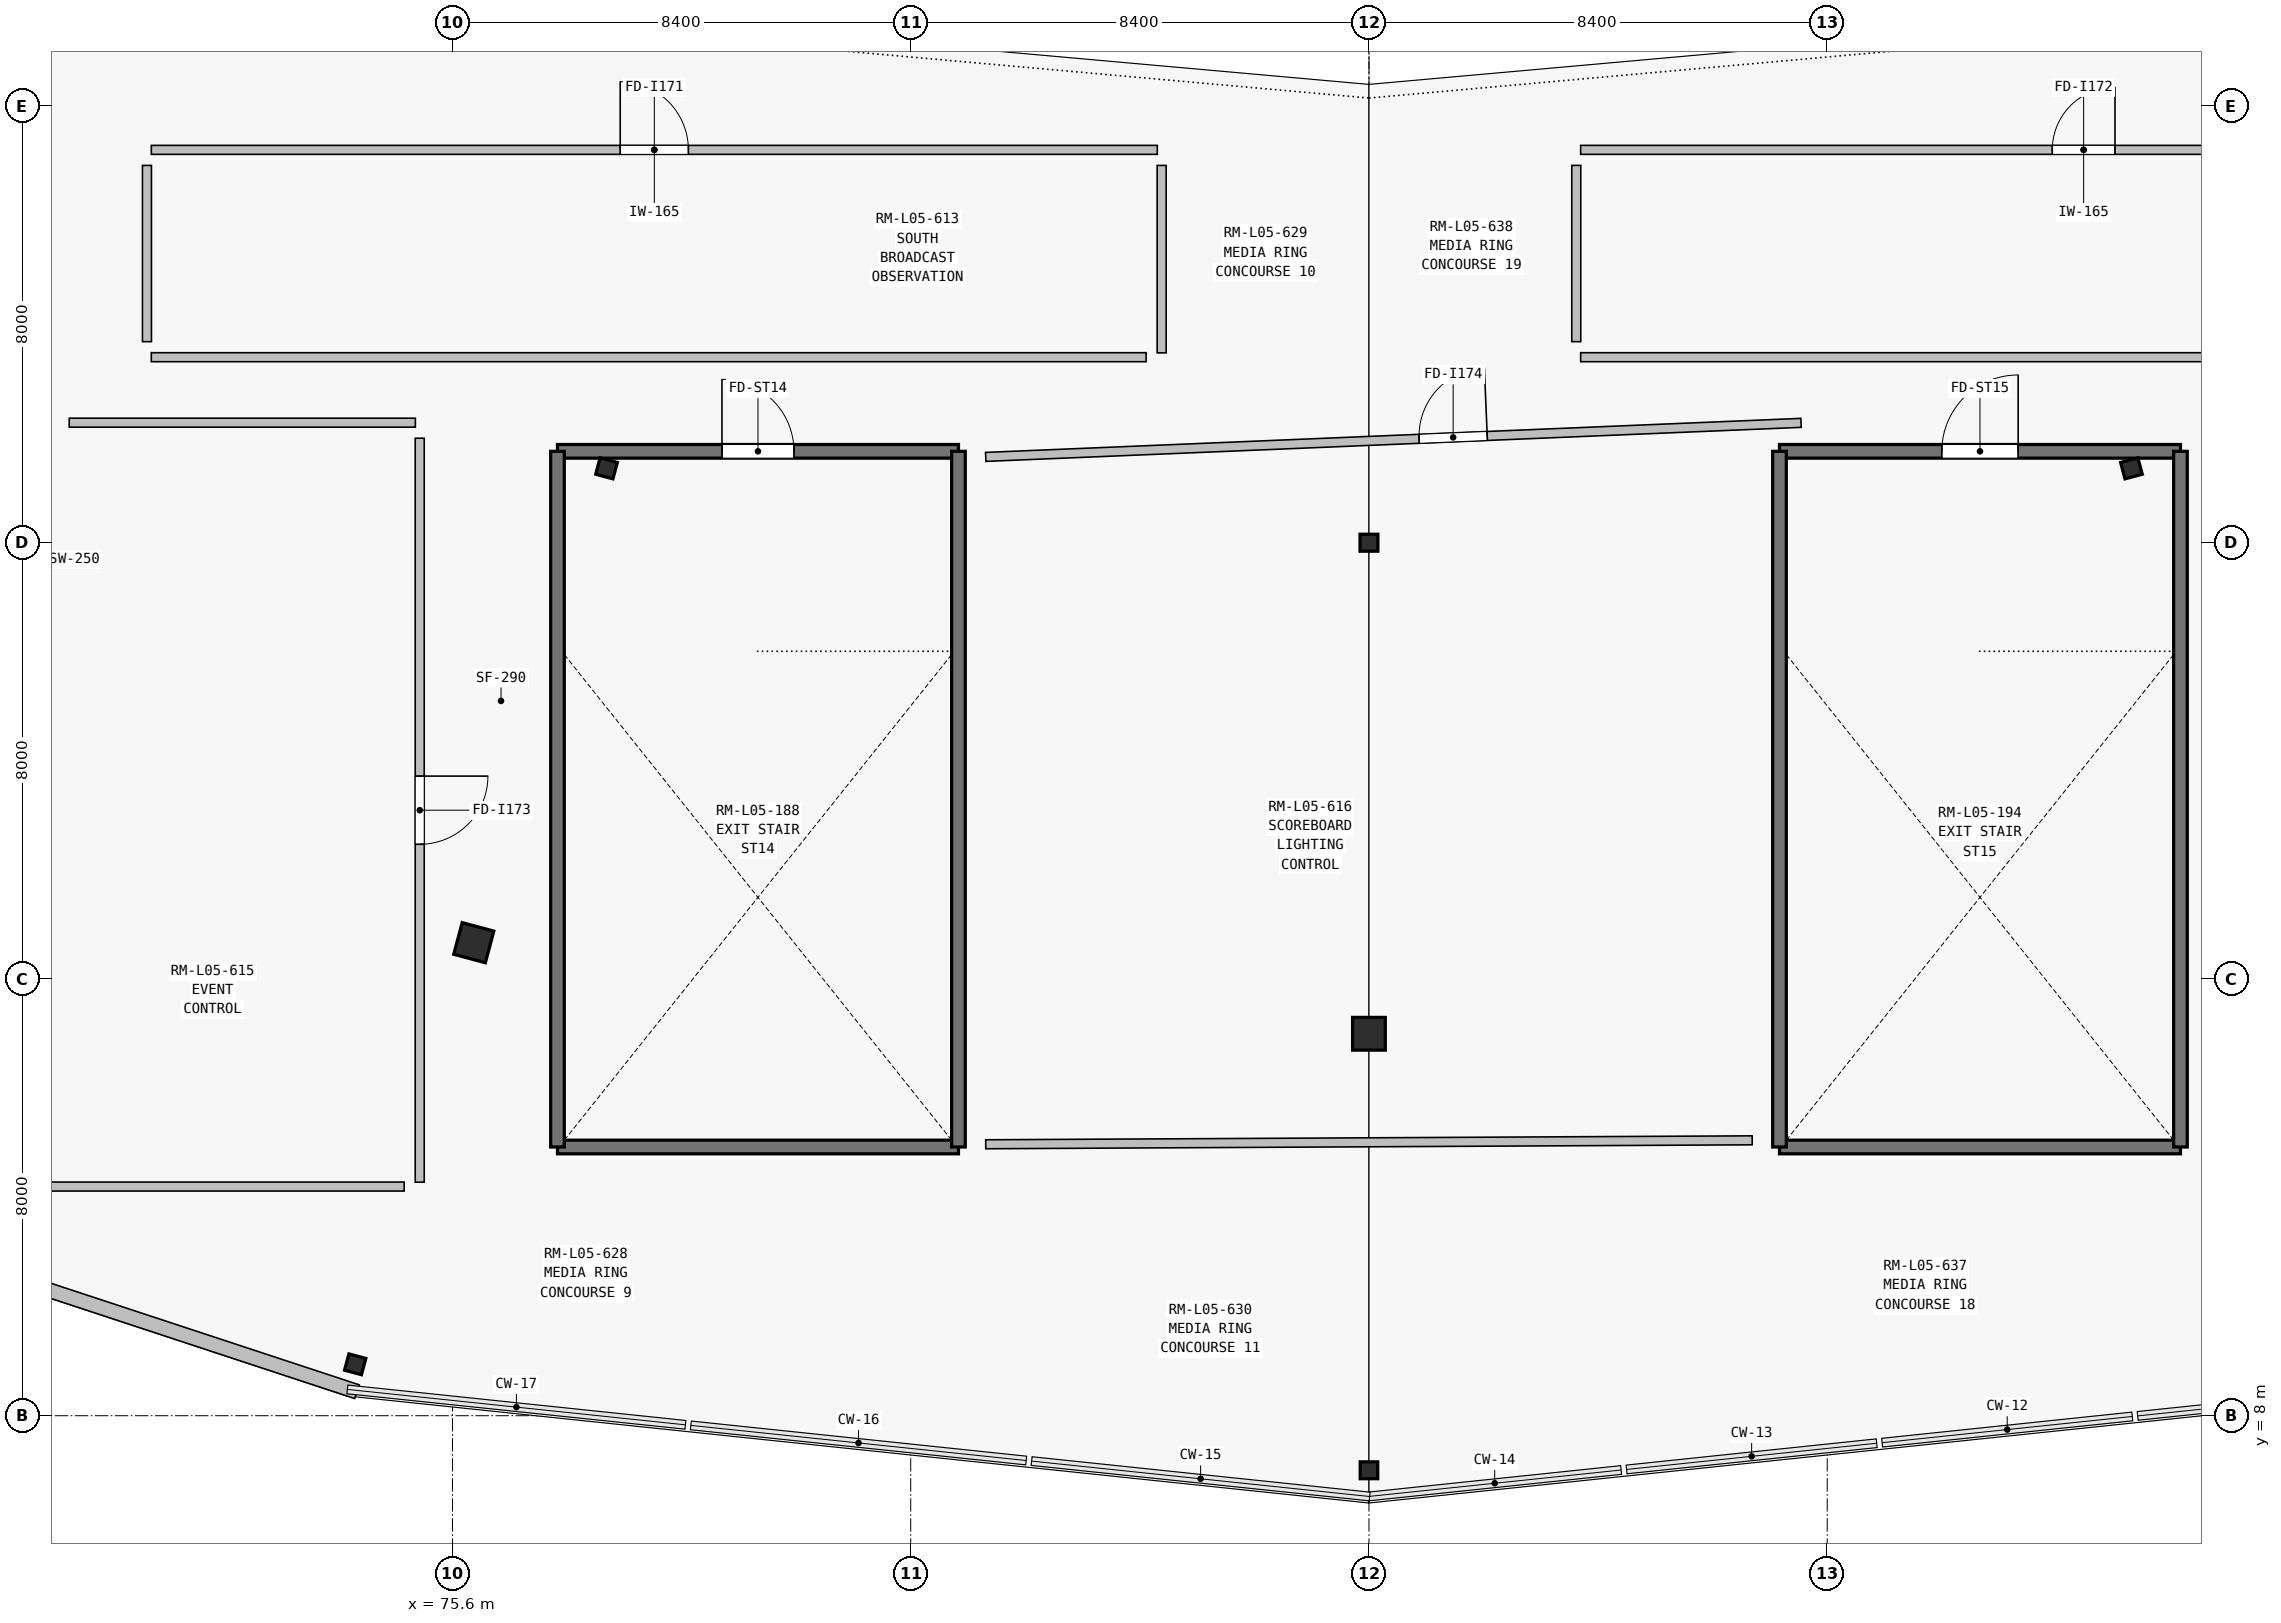
"""IFC4 building model, lengths in metres.
Left out: names, types, materials, properties, quantities, classifications, styles, units other than length and angle.
Written with IfcOpenShell. Run it as: python <this file> out.ifc"""

import sys

from ifc_helpers import new_model, si_unit, direction, frame, frame_2d, origin, origin_2d, place, context, subcontext, project, spatial, rectangle, i_section, extrude, element, fill, save


model = new_model("IFC4")
c1 = context("Model", 3, precision=1e-05, world=origin(), true_north=direction((0.0, 1.0)))
c2 = subcontext(c1, "Body", "Model", "MODEL_VIEW")
j1 = project(units=[si_unit("LENGTHUNIT", "METRE"), si_unit("PLANEANGLEUNIT", "RADIAN")], contexts=[c1])
p1 = place(None, origin())
s1 = spatial("IfcSite", under=j1, at=p1, CompositionType="ELEMENT")
p2 = place(p1, origin())
s2 = spatial("IfcBuilding", under=s1, at=p2, CompositionType="ELEMENT")
p3 = place(p2, frame((0.0, 0.0, 23.4)))
s3 = spatial("IfcBuildingStorey", under=s2, at=p3, CompositionType="ELEMENT", Elevation=23.4)
for number, where, z_axis, x_axis in (
    (1, (78.424, 25.363, 0.0), (0.0, 0.0, 1.0), (-0.259, -0.966, 0.0)),
    (2, (92.4, 24.0, 0.0), (0.0, 0.0, 1.0), (0.0, -1.0, 0.0)),
    (3, (106.376, 25.363, 0.0), (0.0, 0.0, 1.0), (0.259, -0.966, 0.0)),
):
    element("IfcColumn", number, at=place(p3, frame(where, z_axis=z_axis, x_axis=x_axis)), inside=s3, PredefinedType="COLUMN", context=c2, shape_type="SweptSolid", body=[
        extrude(i_section(OverallWidth=0.311, OverallDepth=0.327, WebThickness=0.016, FlangeThickness=0.025, at=origin_2d()), origin(), (0.0, 0.0, 1.0), 3.15),
    ])
for number, where, z_axis, x_axis in (
    (4, (75.991, 16.67, 0.0), (0.0, 0.0, 1.0), (-0.259, -0.966, 0.0)),
    (5, (92.4, 15.0, 0.0), (0.0, 0.0, 1.0), (0.0, -1.0, 0.0)),
):
    element("IfcColumn", number, at=place(p3, frame(where, z_axis=z_axis, x_axis=x_axis)), inside=s3, PredefinedType="COLUMN", context=c2, shape_type="SweptSolid", body=[
        extrude(rectangle(XDim=0.6, YDim=0.6, at=origin_2d()), origin(), (0.0, 0.0, 1.0), 3.15),
    ])
for number, where, z_axis, x_axis in (
    (6, (73.817, 8.942, 0.0), (0.0, 0.0, 1.0), (-0.259, -0.966, 0.0)),
    (7, (92.4, 7.0, 0.0), (0.0, 0.0, 1.0), (0.0, -1.0, 0.0)),
):
    element("IfcColumn", number, at=place(p3, frame(where, z_axis=z_axis, x_axis=x_axis)), inside=s3, PredefinedType="COLUMN", context=c2, shape_type="SweptSolid", body=[
        extrude(i_section(OverallWidth=0.309, OverallDepth=0.321, WebThickness=0.014, FlangeThickness=0.022, at=origin_2d()), origin(), (0.0, 0.0, 1.0), 3.32),
    ])
p4 = place(p3, frame((73.849, 8.44, 0.0), z_axis=(0.0, 0.0, 1.0), x_axis=(-0.949760483421, 0.312977673536, 0.0)))
e8 = element("IfcWall", 8, at=p4, inside=s3, PredefinedType="SOLIDWALL", context=c2, shape_type="SweptSolid", body=[
    extrude(rectangle(XDim=18.693, YDim=0.265, at=frame_2d((9.346, 0.0))), origin(), (0.0, 0.0, 1.0), 3.18),
])
p5 = place(p4, frame((11.85, 0.0, 0.75)))
e9 = element("IfcOpeningElement", 9, at=p5, cuts=e8, PredefinedType="OPENING", context=c2, shape_type="SweptSolid", body=[
    extrude(rectangle(XDim=1.2, YDim=2.2, at=frame_2d((0.6, 1.1))), frame((0.0, 0.142, 0.0), z_axis=(0.0, -1.0, 0.0), x_axis=(1.0, 0.0, 0.0)), (0.0, 0.0, 1.0), 0.285),
])
p6 = place(p3, frame((77.525, 12.925, 0.0), z_axis=(0.0, 0.0, 1.0), x_axis=(1.0, 0.0, 0.0)))
e10 = element("IfcWall", 10, at=p6, inside=s3, PredefinedType="SHEAR", context=c2, shape_type="SweptSolid", body=[
    extrude(rectangle(XDim=7.35, YDim=0.25, at=frame_2d((3.675, 0.0))), origin(), (0.0, 0.0, 1.0), 3.08),
])
p7 = place(p3, frame((77.525, 25.675, 0.0), z_axis=(0.0, 0.0, 1.0), x_axis=(1.0, 0.0, 0.0)))
e11 = element("IfcWall", 11, at=p7, inside=s3, PredefinedType="SHEAR", context=c2, shape_type="SweptSolid", body=[
    extrude(rectangle(XDim=7.35, YDim=0.25, at=frame_2d((3.675, 0.0))), origin(), (0.0, 0.0, 1.0), 3.08),
])
p8 = place(p7, frame((3.015, 0.0, 0.0)))
e12 = element("IfcOpeningElement", 12, at=p8, cuts=e11, PredefinedType="OPENING", context=c2, shape_type="SweptSolid", body=[
    extrude(rectangle(XDim=1.32, YDim=2.2, at=frame_2d((0.66, 1.1))), frame((0.0, 0.135, 0.0), z_axis=(0.0, -1.0, 0.0), x_axis=(1.0, 0.0, 0.0)), (0.0, 0.0, 1.0), 0.27),
])
for number, where, z_axis, x_axis in (
    (13, (77.525, 12.925, 0.0), (0.0, 0.0, 1.0), (0.0, 1.0, 0.0)),
    (14, (84.875, 12.925, 0.0), (0.0, 0.0, 1.0), (0.0, 1.0, 0.0)),
):
    element("IfcWall", number, at=place(p3, frame(where, z_axis=z_axis, x_axis=x_axis)), inside=s3, PredefinedType="SHEAR", context=c2, shape_type="SweptSolid", body=[
        extrude(rectangle(XDim=12.75, YDim=0.25, at=frame_2d((6.375, 0.0))), origin(), (0.0, 0.0, 1.0), 3.08),
    ])
p9 = place(p3, frame((99.925, 12.925, 0.0), z_axis=(0.0, 0.0, 1.0), x_axis=(1.0, 0.0, 0.0)))
e15 = element("IfcWall", 15, at=p9, inside=s3, PredefinedType="SHEAR", context=c2, shape_type="SweptSolid", body=[
    extrude(rectangle(XDim=7.35, YDim=0.25, at=frame_2d((3.675, 0.0))), origin(), (0.0, 0.0, 1.0), 3.08),
])
p10 = place(p3, frame((99.925, 25.675, 0.0), z_axis=(0.0, 0.0, 1.0), x_axis=(1.0, 0.0, 0.0)))
e16 = element("IfcWall", 16, at=p10, inside=s3, PredefinedType="SHEAR", context=c2, shape_type="SweptSolid", body=[
    extrude(rectangle(XDim=7.35, YDim=0.25, at=frame_2d((3.675, 0.0))), origin(), (0.0, 0.0, 1.0), 3.08),
])
p11 = place(p10, frame((2.975, 0.0, 0.0)))
e17 = element("IfcOpeningElement", 17, at=p11, cuts=e16, PredefinedType="OPENING", context=c2, shape_type="SweptSolid", body=[
    extrude(rectangle(XDim=1.4, YDim=2.2, at=frame_2d((0.7, 1.1))), frame((0.0, 0.135, 0.0), z_axis=(0.0, -1.0, 0.0), x_axis=(1.0, 0.0, 0.0)), (0.0, 0.0, 1.0), 0.27),
])
for number, where, z_axis, x_axis in (
    (18, (99.925, 12.925, 0.0), (0.0, 0.0, 1.0), (0.0, 1.0, 0.0)),
    (19, (107.275, 12.925, 0.0), (0.0, 0.0, 1.0), (0.0, 1.0, 0.0)),
):
    element("IfcWall", number, at=place(p3, frame(where, z_axis=z_axis, x_axis=x_axis)), inside=s3, PredefinedType="SHEAR", context=c2, shape_type="SweptSolid", body=[
        extrude(rectangle(XDim=12.75, YDim=0.25, at=frame_2d((6.375, 0.0))), origin(), (0.0, 0.0, 1.0), 3.08),
    ])
p12 = place(p3, frame((70.08, 31.2, 0.0), z_axis=(0.0, 0.0, 1.0), x_axis=(1.0, 0.0, 0.0)))
e20 = element("IfcWall", 20, at=p12, inside=s3, PredefinedType="PARTITIONING", context=c2, shape_type="SweptSolid", body=[
    extrude(rectangle(XDim=18.44, YDim=0.165, at=frame_2d((9.22, 0.0))), origin(), (0.0, 0.0, 1.0), 3.9),
])
p13 = place(p12, frame((8.595, 0.0, 0.0)))
e21 = element("IfcOpeningElement", 21, at=p13, cuts=e20, PredefinedType="OPENING", context=c2, shape_type="SweptSolid", body=[
    extrude(rectangle(XDim=1.25, YDim=2.25, at=frame_2d((0.625, 1.125))), frame((0.0, 0.093, 0.0), z_axis=(0.0, -1.0, 0.0), x_axis=(1.0, 0.0, 0.0)), (0.0, 0.0, 1.0), 0.185),
])
p14 = place(p3, frame((88.6, 30.915, 0.0), z_axis=(0.0, 0.0, 1.0), x_axis=(0.0, -1.0, 0.0)))
e22 = element("IfcWall", 22, at=p14, inside=s3, PredefinedType="PARTITIONING", context=c2, shape_type="SweptSolid", body=[
    extrude(rectangle(XDim=3.435, YDim=0.165, at=frame_2d((1.718, 0.0))), origin(), (0.0, 0.0, 1.0), 3.9),
])
p15 = place(p3, frame((88.315, 27.4, 0.0), z_axis=(0.0, 0.0, 1.0), x_axis=(-1.0, 0.0, 0.0)))
e23 = element("IfcWall", 23, at=p15, inside=s3, PredefinedType="PARTITIONING", context=c2, shape_type="SweptSolid", body=[
    extrude(rectangle(XDim=18.235, YDim=0.165, at=frame_2d((9.118, 0.0))), origin(), (0.0, 0.0, 1.0), 2.445),
])
p16 = place(p3, frame((70.0, 27.685, 0.0), z_axis=(0.0, 0.0, 1.0), x_axis=(0.0, 1.0, 0.0)))
e24 = element("IfcWall", 24, at=p16, inside=s3, PredefinedType="PARTITIONING", context=c2, shape_type="SweptSolid", body=[
    extrude(rectangle(XDim=3.23, YDim=0.165, at=frame_2d((1.615, 0.0))), origin(), (0.0, 0.0, 1.0), 2.445),
])
p17 = place(p3, frame((96.28, 31.2, 0.0), z_axis=(0.0, 0.0, 1.0), x_axis=(1.0, 0.0, 0.0)))
e25 = element("IfcWall", 25, at=p17, inside=s3, PredefinedType="PARTITIONING", context=c2, shape_type="SweptSolid", body=[
    extrude(rectangle(XDim=18.44, YDim=0.165, at=frame_2d((9.22, 0.0))), origin(), (0.0, 0.0, 1.0), 3.9),
])
p18 = place(p17, frame((8.645, 0.0, 0.0)))
e26 = element("IfcOpeningElement", 26, at=p18, cuts=e25, PredefinedType="OPENING", context=c2, shape_type="SweptSolid", body=[
    extrude(rectangle(XDim=1.15, YDim=2.2, at=frame_2d((0.575, 1.1))), frame((0.0, 0.093, 0.0), z_axis=(0.0, -1.0, 0.0), x_axis=(1.0, 0.0, 0.0)), (0.0, 0.0, 1.0), 0.185),
])
p19 = place(p3, frame((114.515, 27.4, 0.0), z_axis=(0.0, 0.0, 1.0), x_axis=(-1.0, 0.0, 0.0)))
e27 = element("IfcWall", 27, at=p19, inside=s3, PredefinedType="PARTITIONING", context=c2, shape_type="SweptSolid", body=[
    extrude(rectangle(XDim=18.235, YDim=0.165, at=frame_2d((9.118, 0.0))), origin(), (0.0, 0.0, 1.0), 2.445),
])
p20 = place(p3, frame((96.2, 27.685, 0.0), z_axis=(0.0, 0.0, 1.0), x_axis=(0.0, 1.0, 0.0)))
e28 = element("IfcWall", 28, at=p20, inside=s3, PredefinedType="PARTITIONING", context=c2, shape_type="SweptSolid", body=[
    extrude(rectangle(XDim=3.23, YDim=0.165, at=frame_2d((1.615, 0.0))), origin(), (0.0, 0.0, 1.0), 3.9),
])
p21 = place(p3, frame((68.575, 26.2, 0.0), z_axis=(0.0, 0.0, 1.0), x_axis=(1.0, 0.0, 0.0)))
e29 = element("IfcWall", 29, at=p21, inside=s3, PredefinedType="PARTITIONING", context=c2, shape_type="SweptSolid", body=[
    extrude(rectangle(XDim=6.345, YDim=0.165, at=frame_2d((3.172, 0.0))), origin(), (0.0, 0.0, 1.0), 2.445),
])
p22 = place(p3, frame((75.0, 25.915, 0.0), z_axis=(0.0, 0.0, 1.0), x_axis=(0.0, -1.0, 0.0)))
e30 = element("IfcWall", 30, at=p22, inside=s3, PredefinedType="PARTITIONING", context=c2, shape_type="SweptSolid", body=[
    extrude(rectangle(XDim=13.635, YDim=0.165, at=frame_2d((6.818, 0.0))), origin(), (0.0, 0.0, 1.0), 2.445),
])
p23 = place(p22, frame((6.193, 0.0, 0.0)))
e31 = element("IfcOpeningElement", 31, at=p23, cuts=e30, PredefinedType="OPENING", context=c2, shape_type="SweptSolid", body=[
    extrude(rectangle(XDim=1.25, YDim=2.25, at=frame_2d((0.625, 1.125))), frame((0.0, 0.093, 0.0), z_axis=(0.0, -1.0, 0.0), x_axis=(1.0, 0.0, 0.0)), (0.0, 0.0, 1.0), 0.185),
])
p24 = place(p3, frame((74.715, 12.2, 0.0), z_axis=(0.0, 0.0, 1.0), x_axis=(-1.0, 0.0, 0.0)))
e32 = element("IfcWall", 32, at=p24, inside=s3, PredefinedType="PARTITIONING", context=c2, shape_type="SweptSolid", body=[
    extrude(rectangle(XDim=7.435, YDim=0.165, at=frame_2d((3.718, 0.0))), origin(), (0.0, 0.0, 1.0), 3.18),
])
p25 = place(p3, frame((85.375, 25.573, 0.0), z_axis=(0.0, 0.0, 1.0), x_axis=(0.999129420221, 0.041718121344, 0.0)))
e33 = element("IfcWall", 33, at=p25, inside=s3, PredefinedType="PARTITIONING", context=c2, shape_type="SweptSolid", body=[
    extrude(rectangle(XDim=14.958, YDim=0.165, at=frame_2d((7.479, 0.0))), origin(), (0.0, 0.0, 1.0), 3.9),
])
p26 = place(p25, frame((7.951, 0.0, 0.0)))
e34 = element("IfcOpeningElement", 34, at=p26, cuts=e33, PredefinedType="OPENING", context=c2, shape_type="SweptSolid", body=[
    extrude(rectangle(XDim=1.25, YDim=2.25, at=frame_2d((0.625, 1.125))), frame((0.0, 0.093, 0.0), z_axis=(0.0, -1.0, 0.0), x_axis=(1.0, 0.0, 0.0)), (0.0, 0.0, 1.0), 0.185),
])
p27 = place(p3, frame((99.425, 13.047, 0.0), z_axis=(0.0, 0.0, 1.0), x_axis=(-0.99998686198, -0.005125999136, 0.0)))
e35 = element("IfcWall", 35, at=p27, inside=s3, PredefinedType="PARTITIONING", context=c2, shape_type="SweptSolid", body=[
    extrude(rectangle(XDim=14.05, YDim=0.165, at=frame_2d((7.025, 0.0))), origin(), (0.0, 0.0, 1.0), 3.18),
])
p28 = place(p8, origin())
e36 = element("IfcDoor", 36, at=p28, inside=s3, OperationType="SINGLE_SWING_LEFT", PredefinedType="DOOR", context=c2, shape_type="SweptSolid", body=[
    extrude(rectangle(XDim=1.32, YDim=2.2, at=frame_2d((0.66, 1.1))), frame((0.0, 0.025, 0.0), z_axis=(0.0, -1.0, 0.0), x_axis=(1.0, 0.0, 0.0)), (0.0, 0.0, 1.0), 0.05),
])
fill(e12, e36)
p29 = place(p11, origin())
e37 = element("IfcDoor", 37, at=p29, inside=s3, OperationType="SINGLE_SWING_RIGHT", PredefinedType="DOOR", context=c2, shape_type="SweptSolid", body=[
    extrude(rectangle(XDim=1.4, YDim=2.2, at=frame_2d((0.7, 1.1))), frame((0.0, 0.025, 0.0), z_axis=(0.0, -1.0, 0.0), x_axis=(1.0, 0.0, 0.0)), (0.0, 0.0, 1.0), 0.05),
])
fill(e17, e37)
p30 = place(p13, origin())
e38 = element("IfcDoor", 38, at=p30, inside=s3, OperationType="SINGLE_SWING_LEFT", PredefinedType="DOOR", context=c2, shape_type="SweptSolid", body=[
    extrude(rectangle(XDim=1.25, YDim=2.25, at=frame_2d((0.625, 1.125))), frame((0.0, 0.025, 0.0), z_axis=(0.0, -1.0, 0.0), x_axis=(1.0, 0.0, 0.0)), (0.0, 0.0, 1.0), 0.05),
])
fill(e21, e38)
p31 = place(p18, origin())
e39 = element("IfcDoor", 39, at=p31, inside=s3, OperationType="SINGLE_SWING_RIGHT", PredefinedType="DOOR", context=c2, shape_type="SweptSolid", body=[
    extrude(rectangle(XDim=1.15, YDim=2.2, at=frame_2d((0.575, 1.1))), frame((0.0, 0.025, 0.0), z_axis=(0.0, -1.0, 0.0), x_axis=(1.0, 0.0, 0.0)), (0.0, 0.0, 1.0), 0.05),
])
fill(e26, e39)
p32 = place(p23, origin())
e40 = element("IfcDoor", 40, at=p32, inside=s3, OperationType="SINGLE_SWING_LEFT", PredefinedType="DOOR", context=c2, shape_type="SweptSolid", body=[
    extrude(rectangle(XDim=1.25, YDim=2.25, at=frame_2d((0.625, 1.125))), frame((0.0, 0.025, 0.0), z_axis=(0.0, -1.0, 0.0), x_axis=(1.0, 0.0, 0.0)), (0.0, 0.0, 1.0), 0.05),
])
fill(e31, e40)
p33 = place(p26, origin())
e41 = element("IfcDoor", 41, at=p33, inside=s3, OperationType="SINGLE_SWING_RIGHT", PredefinedType="DOOR", context=c2, shape_type="SweptSolid", body=[
    extrude(rectangle(XDim=1.25, YDim=2.25, at=frame_2d((0.625, 1.125))), frame((0.0, 0.025, 0.0), z_axis=(0.0, -1.0, 0.0), x_axis=(1.0, 0.0, 0.0)), (0.0, 0.0, 1.0), 0.05),
])
fill(e34, e41)
save(model, sys.argv[1])
